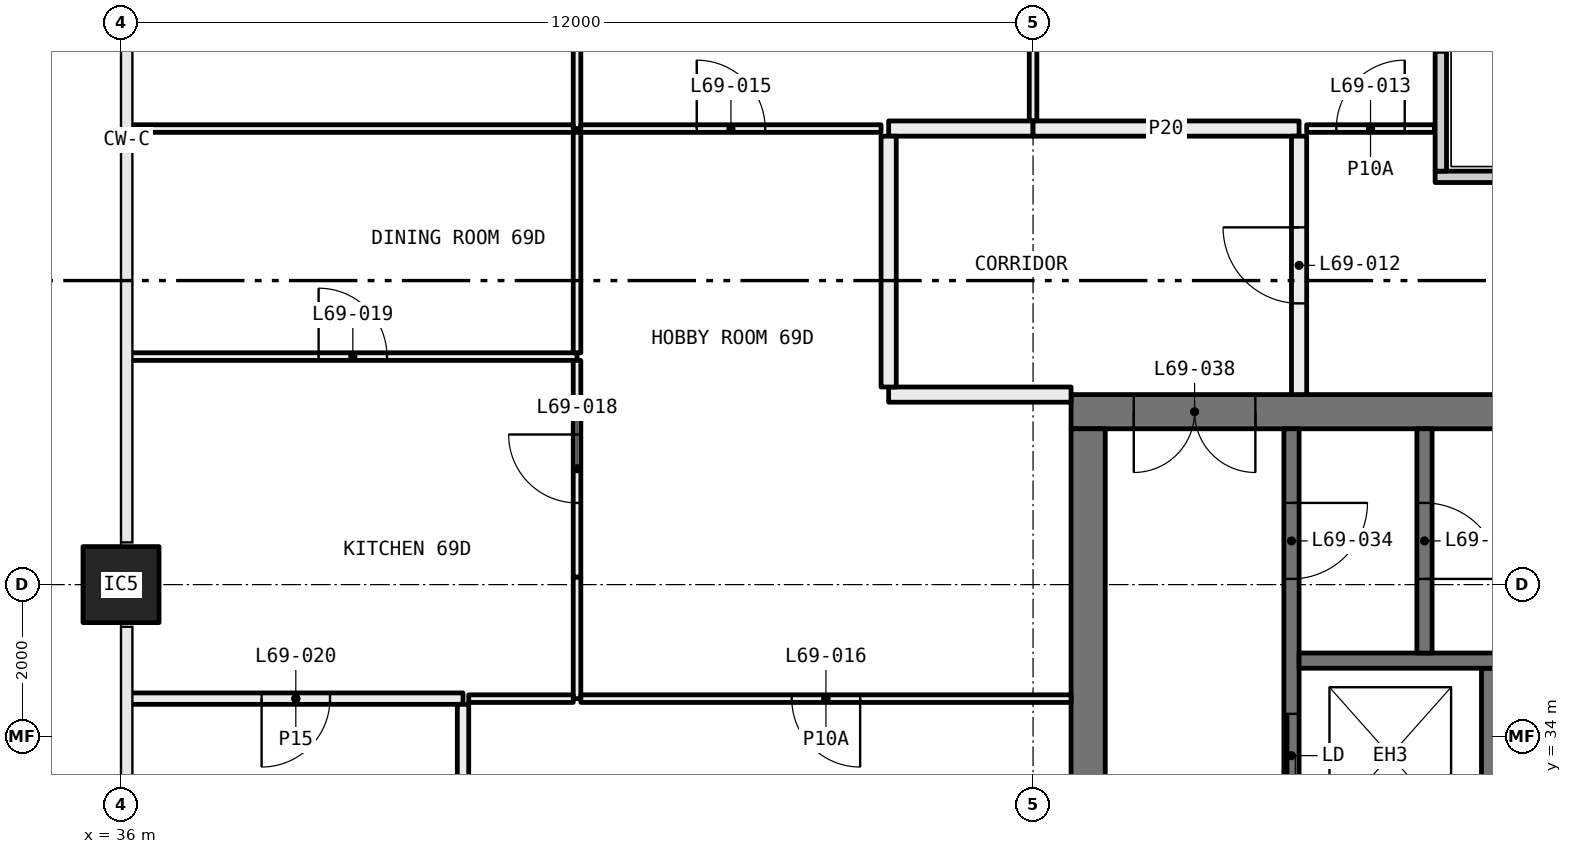
"""IFC4 building model, lengths in metres.
Left out: names, types, materials, properties, quantities, classifications, styles, units other than length and angle.
Written with IfcOpenShell. Run it as: python <this file> out.ifc"""

import sys

from ifc_helpers import new_model, si_unit, direction, frame, frame_2d, origin, origin_2d, place, context, subcontext, project, spatial, rectangle, hollow_rectangle, extrude, element, fill, save


model = new_model("IFC4")
c1 = context("Model", 3, precision=1e-05, world=origin(), true_north=direction((0.0, 1.0)))
c2 = subcontext(c1, "Body", "Model", "MODEL_VIEW")
j1 = project(units=[si_unit("LENGTHUNIT", "METRE"), si_unit("PLANEANGLEUNIT", "RADIAN")], contexts=[c1])
p1 = place(None, origin())
s1 = spatial("IfcSite", under=j1, at=p1, CompositionType="ELEMENT")
p2 = place(p1, origin())
s2 = spatial("IfcBuilding", under=s1, at=p2, CompositionType="ELEMENT")
p3 = place(p2, frame((0.0, 0.0, 255.9)))
s3 = spatial("IfcBuildingStorey", under=s2, at=p3, CompositionType="ELEMENT", Elevation=255.9)
p4 = place(p3, frame((36.0, 36.0, 0.0), z_axis=(0.0, 0.0, 1.0), x_axis=(1.0, 0.0, 0.0)))
e1 = element("IfcColumn", 1, at=p4, inside=s3, PredefinedType="COLUMN", context=c2, shape_type="SweptSolid", body=[
    extrude(hollow_rectangle(XDim=1.0, YDim=1.0, WallThickness=0.04, at=origin_2d()), origin(), (0.0, 0.0, 1.0), 3.05),
])
p5 = place(p3, frame((53.29, 41.365, 0.0), z_axis=(0.0, 0.0, 1.0), x_axis=(1.0, 0.0, 0.0)))
e2 = element("IfcWall", 2, at=p5, inside=s3, PredefinedType="ELEMENTEDWALL", context=c2, shape_type="SweptSolid", body=[
    extrude(rectangle(XDim=6.15, YDim=0.15, at=frame_2d((3.075, 0.0))), origin(), (0.0, 0.0, 1.0), 3.05),
])
p6 = place(p5, frame((1.71, 0.0, 0.45)))
e3 = element("IfcOpeningElement", 3, at=p6, cuts=e2, PredefinedType="OPENING", context=c2, shape_type="SweptSolid", body=[
    extrude(rectangle(XDim=4.0, YDim=2.55, at=frame_2d((2.0, 1.275))), frame((0.0, 0.085, 0.0), z_axis=(0.0, -1.0, 0.0), x_axis=(1.0, 0.0, 0.0)), (0.0, 0.0, 1.0), 0.17),
])
p7 = place(p3, frame((53.365, 41.44, 0.0), z_axis=(0.0, 0.0, 1.0), x_axis=(0.0, 1.0, 0.0)))
e4 = element("IfcWall", 4, at=p7, inside=s3, PredefinedType="ELEMENTEDWALL", context=c2, shape_type="SweptSolid", body=[
    extrude(rectangle(XDim=5.85, YDim=0.15, at=frame_2d((2.925, 0.0))), origin(), (0.0, 0.0, 1.0), 3.05),
])
p8 = place(p7, frame((1.56, 0.0, 0.45)))
e5 = element("IfcOpeningElement", 5, at=p8, cuts=e4, PredefinedType="OPENING", context=c2, shape_type="SweptSolid", body=[
    extrude(rectangle(XDim=4.0, YDim=2.55, at=frame_2d((2.0, 1.275))), frame((0.0, 0.085, 0.0), z_axis=(0.0, -1.0, 0.0), x_axis=(1.0, 0.0, 0.0)), (0.0, 0.0, 1.0), 0.17),
])
p9 = place(p3, frame((42.0, 42.0, 0.0), z_axis=(0.0, 0.0, 1.0), x_axis=(0.0, 1.0, 0.0)))
e6 = element("IfcWall", 6, at=p9, inside=s3, PredefinedType="PARTITIONING", context=c2, shape_type="SweptSolid", body=[
    extrude(rectangle(XDim=5.28, YDim=0.1, at=frame_2d((2.64, 0.0))), origin(), (0.0, 0.0, 1.0), 3.05),
])
p10 = place(p9, frame((2.19, 0.0, 0.0)))
e7 = element("IfcOpeningElement", 7, at=p10, cuts=e6, PredefinedType="OPENING", context=c2, shape_type="SweptSolid", body=[
    extrude(rectangle(XDim=0.9, YDim=2.1, at=frame_2d((0.45, 1.05))), frame((0.0, 0.06, 0.0), z_axis=(0.0, -1.0, 0.0), x_axis=(1.0, 0.0, 0.0)), (0.0, 0.0, 1.0), 0.12),
])
p11 = place(p3, frame((36.1, 42.0, 0.0), z_axis=(0.0, 0.0, 1.0), x_axis=(1.0, 0.0, 0.0)))
e8 = element("IfcWall", 8, at=p11, inside=s3, PredefinedType="PARTITIONING", context=c2, shape_type="SweptSolid", body=[
    extrude(rectangle(XDim=5.85, YDim=0.1, at=frame_2d((2.925, 0.0))), origin(), (0.0, 0.0, 1.0), 3.05),
])
p12 = place(p3, frame((48.0, 42.1, 0.0), z_axis=(0.0, 0.0, 1.0), x_axis=(0.0, 1.0, 0.0)))
e9 = element("IfcWall", 9, at=p12, inside=s3, PredefinedType="PARTITIONING", context=c2, shape_type="SweptSolid", body=[
    extrude(rectangle(XDim=5.18, YDim=0.1, at=frame_2d((2.59, 0.0))), origin(), (0.0, 0.0, 1.0), 3.05),
])
p13 = place(p12, frame((2.14, 0.0, 0.0)))
e10 = element("IfcOpeningElement", 10, at=p13, cuts=e9, PredefinedType="OPENING", context=c2, shape_type="SweptSolid", body=[
    extrude(rectangle(XDim=0.9, YDim=2.1, at=frame_2d((0.45, 1.05))), frame((0.0, 0.06, 0.0), z_axis=(0.0, -1.0, 0.0), x_axis=(1.0, 0.0, 0.0)), (0.0, 0.0, 1.0), 0.12),
])
p14 = place(p3, frame((42.05, 42.0, 0.0), z_axis=(0.0, 0.0, 1.0), x_axis=(1.0, 0.0, 0.0)))
e11 = element("IfcWall", 11, at=p14, inside=s3, PredefinedType="PARTITIONING", context=c2, shape_type="SweptSolid", body=[
    extrude(rectangle(XDim=3.95, YDim=0.1, at=frame_2d((1.975, 0.0))), origin(), (0.0, 0.0, 1.0), 3.05),
])
p15 = place(p14, frame((1.525, 0.0, 0.0)))
e12 = element("IfcOpeningElement", 12, at=p15, cuts=e11, PredefinedType="OPENING", context=c2, shape_type="SweptSolid", body=[
    extrude(rectangle(XDim=0.9, YDim=2.1, at=frame_2d((0.45, 1.05))), frame((0.0, 0.06, 0.0), z_axis=(0.0, -1.0, 0.0), x_axis=(1.0, 0.0, 0.0)), (0.0, 0.0, 1.0), 0.12),
])
p16 = place(p3, frame((46.1, 42.0, 0.0), z_axis=(0.0, 0.0, 1.0), x_axis=(1.0, 0.0, 0.0)))
e13 = element("IfcWall", 13, at=p16, inside=s3, PredefinedType="PARTITIONING", context=c2, shape_type="SweptSolid", body=[
    extrude(rectangle(XDim=1.9, YDim=0.2, at=frame_2d((0.95, 0.0))), origin(), (0.0, 0.0, 1.0), 3.05),
])
p17 = place(p3, frame((51.6, 42.0, 0.0), z_axis=(0.0, 0.0, 1.0), x_axis=(1.0, 0.0, 0.0)))
e14 = element("IfcWall", 14, at=p17, inside=s3, PredefinedType="PARTITIONING", context=c2, shape_type="SweptSolid", body=[
    extrude(rectangle(XDim=1.68, YDim=0.1, at=frame_2d((0.84, 0.0))), origin(), (0.0, 0.0, 1.0), 3.05),
])
p18 = place(p17, frame((0.39, 0.0, 0.0)))
e15 = element("IfcOpeningElement", 15, at=p18, cuts=e14, PredefinedType="OPENING", context=c2, shape_type="SweptSolid", body=[
    extrude(rectangle(XDim=0.9, YDim=2.1, at=frame_2d((0.45, 1.05))), frame((0.0, 0.06, 0.0), z_axis=(0.0, -1.0, 0.0), x_axis=(1.0, 0.0, 0.0)), (0.0, 0.0, 1.0), 0.12),
])
p19 = place(p3, frame((48.0, 42.0, 0.0), z_axis=(0.0, 0.0, 1.0), x_axis=(1.0, 0.0, 0.0)))
e16 = element("IfcWall", 16, at=p19, inside=s3, PredefinedType="PARTITIONING", context=c2, shape_type="SweptSolid", body=[
    extrude(rectangle(XDim=3.5, YDim=0.2, at=frame_2d((1.75, 0.0))), origin(), (0.0, 0.0, 1.0), 3.05),
])
p20 = place(p3, frame((51.5, 41.9, 0.0), z_axis=(0.0, 0.0, 1.0), x_axis=(0.0, -1.0, 0.0)))
e17 = element("IfcWall", 17, at=p20, inside=s3, PredefinedType="PARTITIONING", context=c2, shape_type="SweptSolid", body=[
    extrude(rectangle(XDim=3.4, YDim=0.2, at=frame_2d((1.7, 0.0))), origin(), (0.0, 0.0, 1.0), 3.05),
])
p21 = place(p20, frame((1.2, 0.0, 0.0)))
e18 = element("IfcOpeningElement", 18, at=p21, cuts=e17, PredefinedType="OPENING", context=c2, shape_type="SweptSolid", body=[
    extrude(rectangle(XDim=1.0, YDim=2.1, at=frame_2d((0.5, 1.05))), frame((0.0, 0.11, 0.0), z_axis=(0.0, -1.0, 0.0), x_axis=(1.0, 0.0, 0.0)), (0.0, 0.0, 1.0), 0.22),
])
p22 = place(p3, frame((42.0, 39.0, 0.0), z_axis=(0.0, 0.0, 1.0), x_axis=(-1.0, 0.0, 0.0)))
e19 = element("IfcWall", 19, at=p22, inside=s3, PredefinedType="PARTITIONING", context=c2, shape_type="SweptSolid", body=[
    extrude(rectangle(XDim=5.9, YDim=0.1, at=frame_2d((2.95, 0.0))), origin(), (0.0, 0.0, 1.0), 3.05),
])
p23 = place(p22, frame((2.5, 0.0, 0.0)))
e20 = element("IfcOpeningElement", 20, at=p23, cuts=e19, PredefinedType="OPENING", context=c2, shape_type="SweptSolid", body=[
    extrude(rectangle(XDim=0.9, YDim=2.1, at=frame_2d((0.45, 1.05))), frame((0.0, 0.06, 0.0), z_axis=(0.0, -1.0, 0.0), x_axis=(1.0, 0.0, 0.0)), (0.0, 0.0, 1.0), 0.12),
])
p24 = place(p3, frame((42.0, 34.5, 0.0), z_axis=(0.0, 0.0, 1.0), x_axis=(0.0, 1.0, 0.0)))
e21 = element("IfcWall", 21, at=p24, inside=s3, PredefinedType="PARTITIONING", context=c2, shape_type="SweptSolid", body=[
    extrude(rectangle(XDim=1.6, YDim=0.1, at=frame_2d((0.8, 0.0))), origin(), (0.0, 0.0, 1.0), 2.45),
])
p25 = place(p3, frame((42.0, 36.1, 0.0), z_axis=(0.0, 0.0, 1.0), x_axis=(0.0, 1.0, 0.0)))
e22 = element("IfcWall", 22, at=p25, inside=s3, PredefinedType="PARTITIONING", context=c2, shape_type="SweptSolid", body=[
    extrude(rectangle(XDim=2.85, YDim=0.1, at=frame_2d((1.425, 0.0))), origin(), (0.0, 0.0, 1.0), 3.05),
])
p26 = place(p25, frame((0.975, 0.0, 0.0)))
e23 = element("IfcOpeningElement", 23, at=p26, cuts=e22, PredefinedType="OPENING", context=c2, shape_type="SweptSolid", body=[
    extrude(rectangle(XDim=0.9, YDim=2.1, at=frame_2d((0.45, 1.05))), frame((0.0, 0.06, 0.0), z_axis=(0.0, -1.0, 0.0), x_axis=(1.0, 0.0, 0.0)), (0.0, 0.0, 1.0), 0.12),
])
p27 = place(p3, frame((36.1, 34.5, 0.0), z_axis=(0.0, 0.0, 1.0), x_axis=(1.0, 0.0, 0.0)))
e24 = element("IfcWall", 24, at=p27, inside=s3, PredefinedType="PARTITIONING", context=c2, shape_type="SweptSolid", body=[
    extrude(rectangle(XDim=4.4, YDim=0.15, at=frame_2d((2.2, 0.0))), origin(), (0.0, 0.0, 1.0), 3.05),
])
p28 = place(p27, frame((1.75, 0.0, 0.0)))
e25 = element("IfcOpeningElement", 25, at=p28, cuts=e24, PredefinedType="OPENING", context=c2, shape_type="SweptSolid", body=[
    extrude(rectangle(XDim=0.9, YDim=2.1, at=frame_2d((0.45, 1.05))), frame((0.0, 0.085, 0.0), z_axis=(0.0, -1.0, 0.0), x_axis=(1.0, 0.0, 0.0)), (0.0, 0.0, 1.0), 0.17),
])
p29 = place(p3, frame((40.575, 34.5, 0.0), z_axis=(0.0, 0.0, 1.0), x_axis=(1.0, 0.0, 0.0)))
e26 = element("IfcWall", 26, at=p29, inside=s3, PredefinedType="PARTITIONING", context=c2, shape_type="SweptSolid", body=[
    extrude(rectangle(XDim=1.375, YDim=0.1, at=frame_2d((0.688, 0.0))), origin(), (0.0, 0.0, 1.0), 3.05),
])
p30 = place(p3, frame((42.0, 39.05, 0.0), z_axis=(0.0, 0.0, 1.0), x_axis=(0.0, 1.0, 0.0)))
e27 = element("IfcWall", 27, at=p30, inside=s3, PredefinedType="PARTITIONING", context=c2, shape_type="SweptSolid", body=[
    extrude(rectangle(XDim=2.9, YDim=0.1, at=frame_2d((1.45, 0.0))), origin(), (0.0, 0.0, 1.0), 3.05),
])
p31 = place(p3, frame((42.05, 34.5, 0.0), z_axis=(0.0, 0.0, 1.0), x_axis=(1.0, 0.0, 0.0)))
e28 = element("IfcWall", 28, at=p31, inside=s3, PredefinedType="PARTITIONING", context=c2, shape_type="SweptSolid", body=[
    extrude(rectangle(XDim=6.45, YDim=0.1, at=frame_2d((3.225, 0.0))), origin(), (0.0, 0.0, 1.0), 3.05),
])
p32 = place(p31, frame((2.775, 0.0, 0.0)))
e29 = element("IfcOpeningElement", 29, at=p32, cuts=e28, PredefinedType="OPENING", context=c2, shape_type="SweptSolid", body=[
    extrude(rectangle(XDim=0.9, YDim=2.1, at=frame_2d((0.45, 1.05))), frame((0.0, 0.06, 0.0), z_axis=(0.0, -1.0, 0.0), x_axis=(1.0, 0.0, 0.0)), (0.0, 0.0, 1.0), 0.12),
])
p33 = place(p3, frame((48.5, 38.5, 0.0), z_axis=(0.0, 0.0, 1.0), x_axis=(-1.0, 0.0, 0.0)))
e30 = element("IfcWall", 30, at=p33, inside=s3, PredefinedType="PARTITIONING", context=c2, shape_type="SweptSolid", body=[
    extrude(rectangle(XDim=2.4, YDim=0.2, at=frame_2d((1.2, 0.0))), origin(), (0.0, 0.0, 1.0), 3.05),
])
p34 = place(p3, frame((46.1, 38.6, 0.0), z_axis=(0.0, 0.0, 1.0), x_axis=(0.0, 1.0, 0.0)))
e31 = element("IfcWall", 31, at=p34, inside=s3, PredefinedType="PARTITIONING", context=c2, shape_type="SweptSolid", body=[
    extrude(rectangle(XDim=3.3, YDim=0.2, at=frame_2d((1.65, 0.0))), origin(), (0.0, 0.0, 1.0), 3.05),
])
p35 = place(p3, frame((40.5, 30.1, 0.0), z_axis=(0.0, 0.0, 1.0), x_axis=(0.0, 1.0, 0.0)))
e32 = element("IfcWall", 32, at=p35, inside=s3, PredefinedType="PARTITIONING", context=c2, shape_type="SweptSolid", body=[
    extrude(rectangle(XDim=4.325, YDim=0.15, at=frame_2d((2.163, 0.0))), origin(), (0.0, 0.0, 1.0), 3.05),
])
p36 = place(p3, frame((59.5, 38.275, 0.0), z_axis=(0.0, 0.0, 1.0), x_axis=(-1.0, 0.0, 0.0)))
e33 = element("IfcWall", 33, at=p36, inside=s3, PredefinedType="SHEAR", context=c2, shape_type="SweptSolid", body=[
    extrude(rectangle(XDim=11.0, YDim=0.45, at=frame_2d((5.5, 0.0))), origin(), (0.0, 0.0, 1.0), 3.05),
])
p37 = place(p36, frame((8.575, 0.0, 0.0)))
e34 = element("IfcOpeningElement", 34, at=p37, cuts=e33, PredefinedType="OPENING", context=c2, shape_type="SweptSolid", body=[
    extrude(rectangle(XDim=1.6, YDim=2.1, at=frame_2d((0.8, 1.05))), frame((0.0, 0.235, 0.0), z_axis=(0.0, -1.0, 0.0), x_axis=(1.0, 0.0, 0.0)), (0.0, 0.0, 1.0), 0.47),
])
p38 = place(p3, frame((48.725, 21.95, 0.0), z_axis=(0.0, 0.0, 1.0), x_axis=(0.0, 1.0, 0.0)))
e35 = element("IfcWall", 35, at=p38, inside=s3, PredefinedType="SHEAR", context=c2, shape_type="SweptSolid", body=[
    extrude(rectangle(XDim=16.1, YDim=0.45, at=frame_2d((8.05, 0.0))), origin(), (0.0, 0.0, 1.0), 3.05),
])
p39 = place(p38, frame((7.25, 0.0, 0.0)))
e36 = element("IfcOpeningElement", 36, at=p39, cuts=e35, PredefinedType="OPENING", context=c2, shape_type="SweptSolid", body=[
    extrude(rectangle(XDim=1.6, YDim=2.1, at=frame_2d((0.8, 1.05))), frame((0.0, 0.235, 0.0), z_axis=(0.0, -1.0, 0.0), x_axis=(1.0, 0.0, 0.0)), (0.0, 0.0, 1.0), 0.47),
])
p40 = place(p3, frame((51.4, 25.1, 0.0), z_axis=(0.0, 0.0, 1.0), x_axis=(0.0, 1.0, 0.0)))
e37 = element("IfcWall", 37, at=p40, inside=s3, PredefinedType="SOLIDWALL", context=c2, shape_type="SweptSolid", body=[
    extrude(rectangle(XDim=12.95, YDim=0.2, at=frame_2d((6.475, 0.0))), origin(), (0.0, 0.0, 1.0), 3.05),
])
p41 = place(p40, frame((0.6, 0.0, 0.0)))
e38 = element("IfcOpeningElement", 38, at=p41, cuts=e37, PredefinedType="OPENING", context=c2, shape_type="SweptSolid", body=[
    extrude(rectangle(XDim=1.1, YDim=2.1, at=frame_2d((0.55, 1.05))), frame((0.0, 0.11, 0.0), z_axis=(0.0, -1.0, 0.0), x_axis=(1.0, 0.0, 0.0)), (0.0, 0.0, 1.0), 0.22),
])
p42 = place(p40, frame((3.1, 0.0, 0.0)))
e39 = element("IfcOpeningElement", 39, at=p42, cuts=e37, PredefinedType="OPENING", context=c2, shape_type="SweptSolid", body=[
    extrude(rectangle(XDim=1.1, YDim=2.1, at=frame_2d((0.55, 1.05))), frame((0.0, 0.11, 0.0), z_axis=(0.0, -1.0, 0.0), x_axis=(1.0, 0.0, 0.0)), (0.0, 0.0, 1.0), 0.22),
])
p43 = place(p40, frame((5.6, 0.0, 0.0)))
e40 = element("IfcOpeningElement", 40, at=p43, cuts=e37, PredefinedType="OPENING", context=c2, shape_type="SweptSolid", body=[
    extrude(rectangle(XDim=1.1, YDim=2.1, at=frame_2d((0.55, 1.05))), frame((0.0, 0.11, 0.0), z_axis=(0.0, -1.0, 0.0), x_axis=(1.0, 0.0, 0.0)), (0.0, 0.0, 1.0), 0.22),
])
p44 = place(p40, frame((8.1, 0.0, 0.0)))
e41 = element("IfcOpeningElement", 41, at=p44, cuts=e37, PredefinedType="OPENING", context=c2, shape_type="SweptSolid", body=[
    extrude(rectangle(XDim=1.1, YDim=2.1, at=frame_2d((0.55, 1.05))), frame((0.0, 0.11, 0.0), z_axis=(0.0, -1.0, 0.0), x_axis=(1.0, 0.0, 0.0)), (0.0, 0.0, 1.0), 0.22),
])
p45 = place(p40, frame((10.975, 0.0, 0.0)))
e42 = element("IfcOpeningElement", 42, at=p45, cuts=e37, PredefinedType="OPENING", context=c2, shape_type="SweptSolid", body=[
    extrude(rectangle(XDim=1.0, YDim=2.1, at=frame_2d((0.5, 1.05))), frame((0.0, 0.11, 0.0), z_axis=(0.0, -1.0, 0.0), x_axis=(1.0, 0.0, 0.0)), (0.0, 0.0, 1.0), 0.22),
])
p46 = place(p3, frame((54.0, 25.1, 0.0), z_axis=(0.0, 0.0, 1.0), x_axis=(0.0, 1.0, 0.0)))
e43 = element("IfcWall", 43, at=p46, inside=s3, PredefinedType="SOLIDWALL", context=c2, shape_type="SweptSolid", body=[
    extrude(rectangle(XDim=9.8, YDim=0.2, at=frame_2d((4.9, 0.0))), origin(), (0.0, 0.0, 1.0), 3.05),
])
p47 = place(p3, frame((59.05, 35.0, 0.0), z_axis=(0.0, 0.0, 1.0), x_axis=(-1.0, 0.0, 0.0)))
e44 = element("IfcWall", 44, at=p47, inside=s3, PredefinedType="SOLIDWALL", context=c2, shape_type="SweptSolid", body=[
    extrude(rectangle(XDim=7.55, YDim=0.2, at=frame_2d((3.775, 0.0))), origin(), (0.0, 0.0, 1.0), 3.05),
])
p48 = place(p3, frame((53.15, 35.1, 0.0), z_axis=(0.0, 0.0, 1.0), x_axis=(0.0, 1.0, 0.0)))
e45 = element("IfcWall", 45, at=p48, inside=s3, PredefinedType="SOLIDWALL", context=c2, shape_type="SweptSolid", body=[
    extrude(rectangle(XDim=2.95, YDim=0.2, at=frame_2d((1.475, 0.0))), origin(), (0.0, 0.0, 1.0), 3.05),
])
p49 = place(p48, frame((0.975, 0.0, 0.0)))
e46 = element("IfcOpeningElement", 46, at=p49, cuts=e45, PredefinedType="OPENING", context=c2, shape_type="SweptSolid", body=[
    extrude(rectangle(XDim=1.0, YDim=2.1, at=frame_2d((0.5, 1.05))), frame((0.0, 0.11, 0.0), z_axis=(0.0, -1.0, 0.0), x_axis=(1.0, 0.0, 0.0)), (0.0, 0.0, 1.0), 0.22),
])
p50 = place(p21, frame((1.0, 0.0, 0.0), x_axis=(-1.0, 0.0, 0.0)))
e47 = element("IfcDoor", 47, at=p50, inside=s3, OperationType="SINGLE_SWING_LEFT", PredefinedType="DOOR", context=c2, shape_type="SweptSolid", body=[
    extrude(rectangle(XDim=1.0, YDim=2.1, at=frame_2d((0.5, 1.05))), frame((0.0, 0.025, 0.0), z_axis=(0.0, -1.0, 0.0), x_axis=(1.0, 0.0, 0.0)), (0.0, 0.0, 1.0), 0.05),
])
fill(e18, e47)
p51 = place(p18, origin())
e48 = element("IfcDoor", 48, at=p51, inside=s3, OperationType="SINGLE_SWING_LEFT", PredefinedType="DOOR", context=c2, shape_type="SweptSolid", body=[
    extrude(rectangle(XDim=0.9, YDim=2.1, at=frame_2d((0.45, 1.05))), frame((0.0, 0.025, 0.0), z_axis=(0.0, -1.0, 0.0), x_axis=(1.0, 0.0, 0.0)), (0.0, 0.0, 1.0), 0.05),
])
fill(e15, e48)
p52 = place(p15, origin())
e49 = element("IfcDoor", 49, at=p52, inside=s3, OperationType="SINGLE_SWING_RIGHT", PredefinedType="DOOR", context=c2, shape_type="SweptSolid", body=[
    extrude(rectangle(XDim=0.9, YDim=2.1, at=frame_2d((0.45, 1.05))), frame((0.0, 0.025, 0.0), z_axis=(0.0, -1.0, 0.0), x_axis=(1.0, 0.0, 0.0)), (0.0, 0.0, 1.0), 0.05),
])
fill(e12, e49)
p53 = place(p32, frame((0.9, 0.0, 0.0), x_axis=(-1.0, 0.0, 0.0)))
e50 = element("IfcDoor", 50, at=p53, inside=s3, OperationType="SINGLE_SWING_RIGHT", PredefinedType="DOOR", context=c2, shape_type="SweptSolid", body=[
    extrude(rectangle(XDim=0.9, YDim=2.1, at=frame_2d((0.45, 1.05))), frame((0.0, 0.025, 0.0), z_axis=(0.0, -1.0, 0.0), x_axis=(1.0, 0.0, 0.0)), (0.0, 0.0, 1.0), 0.05),
])
fill(e29, e50)
p54 = place(p26, origin())
e51 = element("IfcDoor", 51, at=p54, inside=s3, OperationType="SINGLE_SWING_LEFT", PredefinedType="DOOR", context=c2, shape_type="SweptSolid", body=[
    extrude(rectangle(XDim=0.9, YDim=2.1, at=frame_2d((0.45, 1.05))), frame((0.0, 0.025, 0.0), z_axis=(0.0, -1.0, 0.0), x_axis=(1.0, 0.0, 0.0)), (0.0, 0.0, 1.0), 0.05),
])
fill(e23, e51)
p55 = place(p23, frame((0.9, 0.0, 0.0), x_axis=(-1.0, 0.0, 0.0)))
e52 = element("IfcDoor", 52, at=p55, inside=s3, OperationType="SINGLE_SWING_RIGHT", PredefinedType="DOOR", context=c2, shape_type="SweptSolid", body=[
    extrude(rectangle(XDim=0.9, YDim=2.1, at=frame_2d((0.45, 1.05))), frame((0.0, 0.025, 0.0), z_axis=(0.0, -1.0, 0.0), x_axis=(1.0, 0.0, 0.0)), (0.0, 0.0, 1.0), 0.05),
])
fill(e20, e52)
p56 = place(p28, frame((0.9, 0.0, 0.0), x_axis=(-1.0, 0.0, 0.0)))
e53 = element("IfcDoor", 53, at=p56, inside=s3, OperationType="SINGLE_SWING_LEFT", PredefinedType="DOOR", context=c2, shape_type="SweptSolid", body=[
    extrude(rectangle(XDim=0.9, YDim=2.1, at=frame_2d((0.45, 1.05))), frame((0.0, 0.025, 0.0), z_axis=(0.0, -1.0, 0.0), x_axis=(1.0, 0.0, 0.0)), (0.0, 0.0, 1.0), 0.05),
])
fill(e25, e53)
p57 = place(p44, origin())
e54 = element("IfcDoor", 54, at=p57, inside=s3, OperationType="SLIDING_TO_LEFT", PredefinedType="DOOR", context=c2, shape_type="SweptSolid", body=[
    extrude(rectangle(XDim=1.1, YDim=2.1, at=frame_2d((0.55, 1.05))), frame((0.0, 0.025, 0.0), z_axis=(0.0, -1.0, 0.0), x_axis=(1.0, 0.0, 0.0)), (0.0, 0.0, 1.0), 0.05),
])
fill(e41, e54)
p58 = place(p45, frame((1.0, 0.0, 0.0), x_axis=(-1.0, 0.0, 0.0)))
e55 = element("IfcDoor", 55, at=p58, inside=s3, OperationType="SINGLE_SWING_RIGHT", PredefinedType="DOOR", context=c2, shape_type="SweptSolid", body=[
    extrude(rectangle(XDim=1.0, YDim=2.1, at=frame_2d((0.5, 1.05))), frame((0.0, 0.025, 0.0), z_axis=(0.0, -1.0, 0.0), x_axis=(1.0, 0.0, 0.0)), (0.0, 0.0, 1.0), 0.05),
])
fill(e42, e55)
p59 = place(p49, frame((1.0, 0.0, 0.0), x_axis=(-1.0, 0.0, 0.0)))
e56 = element("IfcDoor", 56, at=p59, inside=s3, OperationType="SINGLE_SWING_LEFT", PredefinedType="DOOR", context=c2, shape_type="SweptSolid", body=[
    extrude(rectangle(XDim=1.0, YDim=2.1, at=frame_2d((0.5, 1.05))), frame((0.0, 0.025, 0.0), z_axis=(0.0, -1.0, 0.0), x_axis=(1.0, 0.0, 0.0)), (0.0, 0.0, 1.0), 0.05),
])
fill(e46, e56)
p60 = place(p37, origin())
e57 = element("IfcDoor", 57, at=p60, inside=s3, OperationType="DOUBLE_DOOR_SINGLE_SWING", PredefinedType="DOOR", context=c2, shape_type="SweptSolid", body=[
    extrude(rectangle(XDim=1.6, YDim=2.1, at=frame_2d((0.8, 1.05))), frame((0.0, 0.025, 0.0), z_axis=(0.0, -1.0, 0.0), x_axis=(1.0, 0.0, 0.0)), (0.0, 0.0, 1.0), 0.05),
])
fill(e34, e57)
save(model, sys.argv[1])
